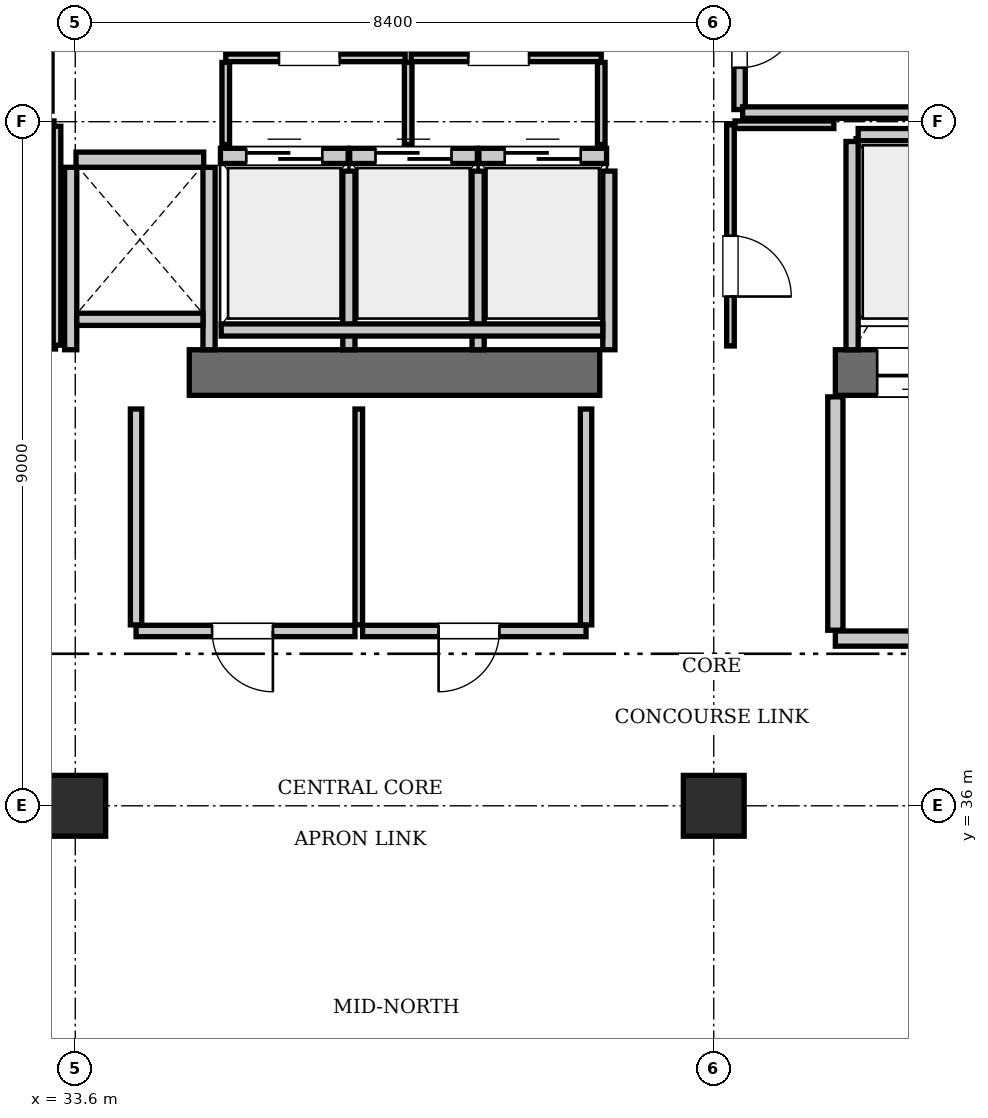
"""IFC4 building model, lengths in metres.
Left out: names, types, materials, properties, quantities, classifications, styles, units other than length and angle.
Written with IfcOpenShell. Run it as: python <this file> out.ifc"""

import sys

from ifc_helpers import new_model, si_unit, direction, frame, frame_2d, origin, origin_2d, place, context, subcontext, project, spatial, rectangle, extrude, element, fill, save


model = new_model("IFC4")
c1 = context("Model", 3, precision=1e-05, world=origin(), true_north=direction((0.0, 1.0)))
c2 = subcontext(c1, "Body", "Model", "MODEL_VIEW")
j1 = project(units=[si_unit("LENGTHUNIT", "METRE"), si_unit("PLANEANGLEUNIT", "RADIAN")], contexts=[c1])
p1 = place(None, origin())
s1 = spatial("IfcSite", under=j1, at=p1, CompositionType="ELEMENT")
p2 = place(p1, origin())
s2 = spatial("IfcBuilding", under=s1, at=p2, CompositionType="ELEMENT")
p3 = place(p2, frame((0.0, 0.0, 301.0)))
s3 = spatial("IfcBuildingStorey", under=s2, at=p3, CompositionType="ELEMENT", Elevation=301.0)
p4 = place(p3, frame((35.1, 41.7, 0.0), z_axis=(0.0, 0.0, 1.0), x_axis=(1.0, 0.0, 0.0)))
e1 = element("IfcWall", 1, at=p4, inside=s3, PredefinedType="SHEAR", context=c2, shape_type="SweptSolid", body=[
    extrude(rectangle(XDim=5.4, YDim=0.6, at=frame_2d((2.7, 0.0))), origin(), (0.0, 0.0, 1.0), 3.85),
])
p5 = place(p3, frame((43.6, 41.7, 0.0), z_axis=(0.0, 0.0, 1.0), x_axis=(1.0, 0.0, 0.0)))
e2 = element("IfcWall", 2, at=p5, inside=s3, PredefinedType="SHEAR", context=c2, shape_type="SweptSolid", body=[
    extrude(rectangle(XDim=6.8, YDim=0.6, at=frame_2d((3.4, 0.0))), origin(), (0.0, 0.0, 1.0), 3.85),
])
p6 = place(p5, frame((3.9, 0.0, 0.0)))
e3 = element("IfcOpeningElement", 3, at=p6, cuts=e2, PredefinedType="OPENING", context=c2, shape_type="SweptSolid", body=[
    extrude(rectangle(XDim=1.15, YDim=2.15, at=frame_2d((0.575, 1.075))), frame((0.0, 0.31, 0.0), z_axis=(0.0, -1.0, 0.0), x_axis=(1.0, 0.0, 0.0)), (0.0, 0.0, 1.0), 0.62),
])
p7 = place(p5, frame((0.55, 0.0, 0.0)))
e4 = element("IfcOpeningElement", 4, at=p7, cuts=e2, PredefinedType="OPENING", context=c2, shape_type="SweptSolid", body=[
    extrude(rectangle(XDim=1.1, YDim=2.2, at=frame_2d((0.55, 1.1))), frame((0.0, 0.31, 0.0), z_axis=(0.0, -1.0, 0.0), x_axis=(1.0, 0.0, 0.0)), (0.0, 0.0, 1.0), 0.62),
])
for number, where, z_axis, x_axis in (
    (5, (33.6, 36.0, 0.0), (0.0, 0.0, 1.0), (1.0, 0.0, 0.0)),
    (6, (42.0, 36.0, 0.0), (0.0, 0.0, 1.0), (1.0, 0.0, 0.0)),
):
    element("IfcColumn", number, at=place(p3, frame(where, z_axis=z_axis, x_axis=x_axis)), inside=s3, PredefinedType="COLUMN", context=c2, shape_type="SweptSolid", body=[
        extrude(rectangle(XDim=0.8, YDim=0.8, at=origin_2d()), origin(), (0.0, 0.0, 1.0), 3.85),
    ])
p8 = place(p3, frame((35.51, 44.55, 0.0), z_axis=(0.0, 0.0, 1.0), x_axis=(1.0, 0.0, 0.0)))
e7 = element("IfcWall", 7, at=p8, inside=s3, PredefinedType="SOLIDWALL", context=c2, shape_type="SweptSolid", body=[
    extrude(rectangle(XDim=1.68, YDim=0.2, at=frame_2d((0.84, 0.0))), origin(), (0.0, 0.0, 1.0), 3.61),
])
p9 = place(p8, frame((0.34, 0.0, 0.0)))
e8 = element("IfcOpeningElement", 8, at=p9, cuts=e7, PredefinedType="OPENING", context=c2, shape_type="SweptSolid", body=[
    extrude(rectangle(XDim=1.0, YDim=2.15, at=frame_2d((0.5, 1.075))), frame((0.0, 0.11, 0.0), z_axis=(0.0, -1.0, 0.0), x_axis=(1.0, 0.0, 0.0)), (0.0, 0.0, 1.0), 0.22),
])
p10 = place(p3, frame((37.21, 44.55, 0.0), z_axis=(0.0, 0.0, 1.0), x_axis=(1.0, 0.0, 0.0)))
e9 = element("IfcWall", 9, at=p10, inside=s3, PredefinedType="SOLIDWALL", context=c2, shape_type="SweptSolid", body=[
    extrude(rectangle(XDim=1.68, YDim=0.2, at=frame_2d((0.84, 0.0))), origin(), (0.0, 0.0, 1.0), 3.61),
])
p11 = place(p10, frame((0.34, 0.0, 0.0)))
e10 = element("IfcOpeningElement", 10, at=p11, cuts=e9, PredefinedType="OPENING", context=c2, shape_type="SweptSolid", body=[
    extrude(rectangle(XDim=1.0, YDim=2.15, at=frame_2d((0.5, 1.075))), frame((0.0, 0.11, 0.0), z_axis=(0.0, -1.0, 0.0), x_axis=(1.0, 0.0, 0.0)), (0.0, 0.0, 1.0), 0.22),
])
p12 = place(p3, frame((38.91, 44.55, 0.0), z_axis=(0.0, 0.0, 1.0), x_axis=(1.0, 0.0, 0.0)))
e11 = element("IfcWall", 11, at=p12, inside=s3, PredefinedType="SOLIDWALL", context=c2, shape_type="SweptSolid", body=[
    extrude(rectangle(XDim=1.68, YDim=0.2, at=frame_2d((0.84, 0.0))), origin(), (0.0, 0.0, 1.0), 3.61),
])
p13 = place(p12, frame((0.34, 0.0, 0.0)))
e12 = element("IfcOpeningElement", 12, at=p13, cuts=e11, PredefinedType="OPENING", context=c2, shape_type="SweptSolid", body=[
    extrude(rectangle(XDim=1.0, YDim=2.15, at=frame_2d((0.5, 1.075))), frame((0.0, 0.11, 0.0), z_axis=(0.0, -1.0, 0.0), x_axis=(1.0, 0.0, 0.0)), (0.0, 0.0, 1.0), 0.22),
])
p14 = place(p3, frame((33.61, 44.5, 0.0), z_axis=(0.0, 0.0, 1.0), x_axis=(1.0, 0.0, 0.0)))
e13 = element("IfcWall", 13, at=p14, inside=s3, PredefinedType="SOLIDWALL", context=c2, shape_type="SweptSolid", body=[
    extrude(rectangle(XDim=1.68, YDim=0.2, at=frame_2d((0.84, 0.0))), origin(), (0.0, 0.0, 1.0), 3.61),
])
p15 = place(p3, frame((43.9, 44.83, 0.0), z_axis=(0.0, 0.0, 1.0), x_axis=(1.0, 0.0, 0.0)))
e14 = element("IfcWall", 14, at=p15, inside=s3, PredefinedType="SOLIDWALL", context=c2, shape_type="SweptSolid", body=[
    extrude(rectangle(XDim=1.6, YDim=0.16, at=frame_2d((0.8, 0.0))), origin(), (0.0, 0.0, 1.0), 3.61),
])
p16 = place(p3, frame((43.82, 42.0, 0.0), z_axis=(0.0, 0.0, 1.0), x_axis=(0.0, 1.0, 0.0)))
e15 = element("IfcWall", 15, at=p16, inside=s3, PredefinedType="SOLIDWALL", context=c2, shape_type="SweptSolid", body=[
    extrude(rectangle(XDim=2.74, YDim=0.16, at=frame_2d((1.37, 0.0))), origin(), (0.0, 0.0, 1.0), 3.61),
])
for number, where, z_axis, x_axis in (
    (16, (37.2, 42.0, 0.0), (0.0, 0.0, 1.0), (0.0, 1.0, 0.0)),
    (17, (38.9, 42.0, 0.0), (0.0, 0.0, 1.0), (0.0, 1.0, 0.0)),
    (18, (40.62, 42.0, 0.0), (0.0, 0.0, 1.0), (0.0, 1.0, 0.0)),
):
    element("IfcWall", number, at=place(p3, frame(where, z_axis=z_axis, x_axis=x_axis)), inside=s3, PredefinedType="SOLIDWALL", context=c2, shape_type="SweptSolid", body=[
        extrude(rectangle(XDim=2.35, YDim=0.16, at=frame_2d((1.175, 0.0))), origin(), (0.0, 0.0, 1.0), 3.61),
    ])
p17 = place(p3, frame((35.52, 42.26, 0.0), z_axis=(0.0, 0.0, 1.0), x_axis=(1.0, 0.0, 0.0)))
e19 = element("IfcWall", 19, at=p17, inside=s3, PredefinedType="SOLIDWALL", context=c2, shape_type="SweptSolid", body=[
    extrude(rectangle(XDim=5.02, YDim=0.16, at=frame_2d((2.51, 0.0))), origin(), (0.0, 0.0, 1.0), 3.61),
])
for number, where, z_axis, x_axis in (
    (20, (33.54, 42.0, 0.0), (0.0, 0.0, 1.0), (0.0, 1.0, 0.0)),
    (21, (35.36, 42.0, 0.0), (0.0, 0.0, 1.0), (0.0, 1.0, 0.0)),
):
    element("IfcWall", number, at=place(p3, frame(where, z_axis=z_axis, x_axis=x_axis)), inside=s3, PredefinedType="SOLIDWALL", context=c2, shape_type="SweptSolid", body=[
        extrude(rectangle(XDim=2.4, YDim=0.16, at=frame_2d((1.2, 0.0))), origin(), (0.0, 0.0, 1.0), 3.61),
    ])
p18 = place(p3, frame((33.62, 42.4, 0.0), z_axis=(0.0, 0.0, 1.0), x_axis=(1.0, 0.0, 0.0)))
e22 = element("IfcWall", 22, at=p18, inside=s3, PredefinedType="SOLIDWALL", context=c2, shape_type="SweptSolid", body=[
    extrude(rectangle(XDim=1.66, YDim=0.16, at=frame_2d((0.83, 0.0))), origin(), (0.0, 0.0, 1.0), 3.61),
])
p19 = place(p3, frame((43.6, 38.2, 0.0), z_axis=(0.0, 0.0, 1.0), x_axis=(1.0, 0.0, 0.0)))
e23 = element("IfcWall", 23, at=p19, inside=s3, PredefinedType="PARTITIONING", context=c2, shape_type="SweptSolid", body=[
    extrude(rectangle(XDim=5.8, YDim=0.2, at=frame_2d((2.9, 0.0))), origin(), (0.0, 0.0, 1.0), 3.61),
])
p20 = place(p19, frame((2.3, 0.0, 0.0)))
e24 = element("IfcOpeningElement", 24, at=p20, cuts=e23, PredefinedType="OPENING", context=c2, shape_type="SweptSolid", body=[
    extrude(rectangle(XDim=1.15, YDim=2.15, at=frame_2d((0.575, 1.075))), frame((0.0, 0.11, 0.0), z_axis=(0.0, -1.0, 0.0), x_axis=(1.0, 0.0, 0.0)), (0.0, 0.0, 1.0), 0.22),
])
p21 = place(p3, frame((43.6, 38.31, 0.0), z_axis=(0.0, 0.0, 1.0), x_axis=(0.0, 1.0, 0.0)))
e25 = element("IfcWall", 25, at=p21, inside=s3, PredefinedType="PARTITIONING", context=c2, shape_type="SweptSolid", body=[
    extrude(rectangle(XDim=3.07, YDim=0.2, at=frame_2d((1.535, 0.0))), origin(), (0.0, 0.0, 1.0), 3.61),
])
p22 = place(p3, frame((32.02, 42.06, 0.0), z_axis=(0.0, 0.0, 1.0), x_axis=(1.0, 0.0, 0.0)))
e26 = element("IfcWall", 26, at=p22, inside=s3, PredefinedType="PARTITIONING", context=c2, shape_type="SweptSolid", body=[
    extrude(rectangle(XDim=1.32, YDim=0.1, at=frame_2d((0.66, 0.0))), origin(), (0.0, 0.0, 1.0), 3.61),
])
p23 = place(p22, frame((0.24, 0.0, 0.0)))
e27 = element("IfcOpeningElement", 27, at=p23, cuts=e26, PredefinedType="OPENING", context=c2, shape_type="SweptSolid", body=[
    extrude(rectangle(XDim=0.8, YDim=2.05, at=frame_2d((0.4, 1.025))), frame((0.0, 0.06, 0.0), z_axis=(0.0, -1.0, 0.0), x_axis=(1.0, 0.0, 0.0)), (0.0, 0.0, 1.0), 0.12),
])
p24 = place(p3, frame((31.84, 44.96, 0.0), z_axis=(0.0, 0.0, 1.0), x_axis=(1.0, 0.0, 0.0)))
e28 = element("IfcWall", 28, at=p24, inside=s3, PredefinedType="PARTITIONING", context=c2, shape_type="SweptSolid", body=[
    extrude(rectangle(XDim=1.48, YDim=0.1, at=frame_2d((0.74, 0.0))), origin(), (0.0, 0.0, 1.0), 3.61),
])
p25 = place(p3, frame((33.36, 42.06, 0.0), z_axis=(0.0, 0.0, 1.0), x_axis=(0.0, 1.0, 0.0)))
e29 = element("IfcWall", 29, at=p25, inside=s3, PredefinedType="PARTITIONING", context=c2, shape_type="SweptSolid", body=[
    extrude(rectangle(XDim=2.88, YDim=0.1, at=frame_2d((1.44, 0.0))), origin(), (0.0, 0.0, 1.0), 3.61),
])
p26 = place(p3, frame((35.58, 45.84, 0.0), z_axis=(0.0, 0.0, 1.0), x_axis=(1.0, 0.0, 0.0)))
e30 = element("IfcWall", 30, at=p26, inside=s3, PredefinedType="PARTITIONING", context=c2, shape_type="SweptSolid", body=[
    extrude(rectangle(XDim=2.36, YDim=0.1, at=frame_2d((1.18, 0.0))), origin(), (0.0, 0.0, 1.0), 3.61),
])
p27 = place(p26, frame((0.7, 0.0, 0.0)))
e31 = element("IfcOpeningElement", 31, at=p27, cuts=e30, PredefinedType="OPENING", context=c2, shape_type="SweptSolid", body=[
    extrude(rectangle(XDim=0.8, YDim=2.05, at=frame_2d((0.4, 1.025))), frame((0.0, 0.06, 0.0), z_axis=(0.0, -1.0, 0.0), x_axis=(1.0, 0.0, 0.0)), (0.0, 0.0, 1.0), 0.12),
])
p28 = place(p3, frame((38.02, 45.84, 0.0), z_axis=(0.0, 0.0, 1.0), x_axis=(1.0, 0.0, 0.0)))
e32 = element("IfcWall", 32, at=p28, inside=s3, PredefinedType="PARTITIONING", context=c2, shape_type="SweptSolid", body=[
    extrude(rectangle(XDim=2.5, YDim=0.1, at=frame_2d((1.25, 0.0))), origin(), (0.0, 0.0, 1.0), 3.61),
])
p29 = place(p28, frame((0.75, 0.0, 0.0)))
e33 = element("IfcOpeningElement", 33, at=p29, cuts=e32, PredefinedType="OPENING", context=c2, shape_type="SweptSolid", body=[
    extrude(rectangle(XDim=0.8, YDim=2.05, at=frame_2d((0.4, 1.025))), frame((0.0, 0.06, 0.0), z_axis=(0.0, -1.0, 0.0), x_axis=(1.0, 0.0, 0.0)), (0.0, 0.0, 1.0), 0.12),
])
for number, where, z_axis, x_axis in (
    (34, (35.58, 44.7, 0.0), (0.0, 0.0, 1.0), (0.0, 1.0, 0.0)),
    (35, (37.98, 44.7, 0.0), (0.0, 0.0, 1.0), (0.0, 1.0, 0.0)),
    (36, (40.52, 44.7, 0.0), (0.0, 0.0, 1.0), (0.0, 1.0, 0.0)),
):
    element("IfcWall", number, at=place(p3, frame(where, z_axis=z_axis, x_axis=x_axis)), inside=s3, PredefinedType="PARTITIONING", context=c2, shape_type="SweptSolid", body=[
        extrude(rectangle(XDim=1.08, YDim=0.1, at=frame_2d((0.54, 0.0))), origin(), (0.0, 0.0, 1.0), 3.61),
    ])
p30 = place(p3, frame((42.22, 42.05, 0.0), z_axis=(0.0, 0.0, 1.0), x_axis=(0.0, 1.0, 0.0)))
e37 = element("IfcWall", 37, at=p30, inside=s3, PredefinedType="PARTITIONING", context=c2, shape_type="SweptSolid", body=[
    extrude(rectangle(XDim=2.91, YDim=0.1, at=frame_2d((1.455, 0.0))), origin(), (0.0, 0.0, 1.0), 3.61),
])
p31 = place(p30, frame((0.65, 0.0, 0.0)))
e38 = element("IfcOpeningElement", 38, at=p31, cuts=e37, PredefinedType="OPENING", context=c2, shape_type="SweptSolid", body=[
    extrude(rectangle(XDim=0.8, YDim=2.05, at=frame_2d((0.4, 1.025))), frame((0.0, 0.06, 0.0), z_axis=(0.0, -1.0, 0.0), x_axis=(1.0, 0.0, 0.0)), (0.0, 0.0, 1.0), 0.12),
])
p32 = place(p3, frame((42.28, 44.96, 0.0), z_axis=(0.0, 0.0, 1.0), x_axis=(1.0, 0.0, 0.0)))
e39 = element("IfcWall", 39, at=p32, inside=s3, PredefinedType="PARTITIONING", context=c2, shape_type="SweptSolid", body=[
    extrude(rectangle(XDim=1.3, YDim=0.1, at=frame_2d((0.65, 0.0))), origin(), (0.0, 0.0, 1.0), 3.61),
])
p33 = place(p3, frame((42.34, 45.16, 0.0), z_axis=(0.0, 0.0, 1.0), x_axis=(0.0, 1.0, 0.0)))
e40 = element("IfcWall", 40, at=p33, inside=s3, PredefinedType="PARTITIONING", context=c2, shape_type="SweptSolid", body=[
    extrude(rectangle(XDim=2.38, YDim=0.15, at=frame_2d((1.19, 0.0))), origin(), (0.0, 0.0, 1.0), 3.61),
])
p34 = place(p33, frame((0.55, 0.0, 0.0)))
e41 = element("IfcOpeningElement", 41, at=p34, cuts=e40, PredefinedType="OPENING", context=c2, shape_type="SweptSolid", body=[
    extrude(rectangle(XDim=0.8, YDim=2.05, at=frame_2d((0.4, 1.025))), frame((0.0, 0.085, 0.0), z_axis=(0.0, -1.0, 0.0), x_axis=(1.0, 0.0, 0.0)), (0.0, 0.0, 1.0), 0.17),
])
p35 = place(p3, frame((42.38, 45.12, 0.0), z_axis=(0.0, 0.0, 1.0), x_axis=(1.0, 0.0, 0.0)))
e42 = element("IfcWall", 42, at=p35, inside=s3, PredefinedType="PARTITIONING", context=c2, shape_type="SweptSolid", body=[
    extrude(rectangle(XDim=3.14, YDim=0.15, at=frame_2d((1.57, 0.0))), origin(), (0.0, 0.0, 1.0), 3.61),
])
p36 = place(p3, frame((34.4, 38.3, 0.0), z_axis=(0.0, 0.0, 1.0), x_axis=(1.0, 0.0, 0.0)))
e43 = element("IfcWall", 43, at=p36, inside=s3, PredefinedType="PARTITIONING", context=c2, shape_type="SweptSolid", body=[
    extrude(rectangle(XDim=2.88, YDim=0.15, at=frame_2d((1.44, 0.0))), origin(), (0.0, 0.0, 1.0), 3.61),
])
p37 = place(p36, frame((1.0, 0.0, 0.0)))
e44 = element("IfcOpeningElement", 44, at=p37, cuts=e43, PredefinedType="OPENING", context=c2, shape_type="SweptSolid", body=[
    extrude(rectangle(XDim=0.8, YDim=2.05, at=frame_2d((0.4, 1.025))), frame((0.0, 0.085, 0.0), z_axis=(0.0, -1.0, 0.0), x_axis=(1.0, 0.0, 0.0)), (0.0, 0.0, 1.0), 0.17),
])
p38 = place(p3, frame((37.38, 38.3, 0.0), z_axis=(0.0, 0.0, 1.0), x_axis=(1.0, 0.0, 0.0)))
e45 = element("IfcWall", 45, at=p38, inside=s3, PredefinedType="PARTITIONING", context=c2, shape_type="SweptSolid", body=[
    extrude(rectangle(XDim=2.94, YDim=0.15, at=frame_2d((1.47, 0.0))), origin(), (0.0, 0.0, 1.0), 3.61),
])
p39 = place(p38, frame((1.0, 0.0, 0.0)))
e46 = element("IfcOpeningElement", 46, at=p39, cuts=e45, PredefinedType="OPENING", context=c2, shape_type="SweptSolid", body=[
    extrude(rectangle(XDim=0.8, YDim=2.05, at=frame_2d((0.4, 1.025))), frame((0.0, 0.085, 0.0), z_axis=(0.0, -1.0, 0.0), x_axis=(1.0, 0.0, 0.0)), (0.0, 0.0, 1.0), 0.17),
])
p40 = place(p3, frame((34.4, 38.38, 0.0), z_axis=(0.0, 0.0, 1.0), x_axis=(0.0, 1.0, 0.0)))
e47 = element("IfcWall", 47, at=p40, inside=s3, PredefinedType="PARTITIONING", context=c2, shape_type="SweptSolid", body=[
    extrude(rectangle(XDim=2.84, YDim=0.15, at=frame_2d((1.42, 0.0))), origin(), (0.0, 0.0, 1.0), 3.61),
])
p41 = place(p3, frame((37.33, 38.38, 0.0), z_axis=(0.0, 0.0, 1.0), x_axis=(0.0, 1.0, 0.0)))
e48 = element("IfcWall", 48, at=p41, inside=s3, PredefinedType="PARTITIONING", context=c2, shape_type="SweptSolid", body=[
    extrude(rectangle(XDim=2.84, YDim=0.1, at=frame_2d((1.42, 0.0))), origin(), (0.0, 0.0, 1.0), 3.61),
])
p42 = place(p3, frame((40.32, 38.38, 0.0), z_axis=(0.0, 0.0, 1.0), x_axis=(0.0, 1.0, 0.0)))
e49 = element("IfcWall", 49, at=p42, inside=s3, PredefinedType="PARTITIONING", context=c2, shape_type="SweptSolid", body=[
    extrude(rectangle(XDim=2.84, YDim=0.15, at=frame_2d((1.42, 0.0))), origin(), (0.0, 0.0, 1.0), 3.61),
])
p43 = place(p9, origin())
e50 = element("IfcDoor", 50, at=p43, inside=s3, OperationType="SLIDING_TO_LEFT", PredefinedType="DOOR", context=c2, shape_type="SweptSolid", body=[
    extrude(rectangle(XDim=1.0, YDim=2.15, at=frame_2d((0.5, 1.075))), frame((0.0, 0.025, 0.0), z_axis=(0.0, -1.0, 0.0), x_axis=(1.0, 0.0, 0.0)), (0.0, 0.0, 1.0), 0.05),
])
fill(e8, e50)
p44 = place(p11, origin())
e51 = element("IfcDoor", 51, at=p44, inside=s3, OperationType="SLIDING_TO_LEFT", PredefinedType="DOOR", context=c2, shape_type="SweptSolid", body=[
    extrude(rectangle(XDim=1.0, YDim=2.15, at=frame_2d((0.5, 1.075))), frame((0.0, 0.025, 0.0), z_axis=(0.0, -1.0, 0.0), x_axis=(1.0, 0.0, 0.0)), (0.0, 0.0, 1.0), 0.05),
])
fill(e10, e51)
p45 = place(p13, origin())
e52 = element("IfcDoor", 52, at=p45, inside=s3, OperationType="SLIDING_TO_LEFT", PredefinedType="DOOR", context=c2, shape_type="SweptSolid", body=[
    extrude(rectangle(XDim=1.0, YDim=2.15, at=frame_2d((0.5, 1.075))), frame((0.0, 0.025, 0.0), z_axis=(0.0, -1.0, 0.0), x_axis=(1.0, 0.0, 0.0)), (0.0, 0.0, 1.0), 0.05),
])
fill(e12, e52)
p46 = place(p7, frame((1.1, 0.0, 0.0), z_axis=(0.0, 0.0, 1.0), x_axis=(-1.0, 0.0, 0.0)))
e53 = element("IfcDoor", 53, at=p46, inside=s3, OperationType="SLIDING_TO_LEFT", PredefinedType="DOOR", context=c2, shape_type="SweptSolid", body=[
    extrude(rectangle(XDim=1.1, YDim=2.2, at=frame_2d((0.55, 1.1))), frame((0.0, 0.025, 0.0), z_axis=(0.0, -1.0, 0.0), x_axis=(1.0, 0.0, 0.0)), (0.0, 0.0, 1.0), 0.05),
])
fill(e4, e53)
p47 = place(p27, origin())
e54 = element("IfcDoor", 54, at=p47, inside=s3, OperationType="SINGLE_SWING_RIGHT", PredefinedType="DOOR", context=c2, shape_type="SweptSolid", body=[
    extrude(rectangle(XDim=0.8, YDim=2.05, at=frame_2d((0.4, 1.025))), frame((0.0, 0.025, 0.0), z_axis=(0.0, -1.0, 0.0), x_axis=(1.0, 0.0, 0.0)), (0.0, 0.0, 1.0), 0.05),
])
fill(e31, e54)
p48 = place(p29, origin())
e55 = element("IfcDoor", 55, at=p48, inside=s3, OperationType="SINGLE_SWING_LEFT", PredefinedType="DOOR", context=c2, shape_type="SweptSolid", body=[
    extrude(rectangle(XDim=0.8, YDim=2.05, at=frame_2d((0.4, 1.025))), frame((0.0, 0.025, 0.0), z_axis=(0.0, -1.0, 0.0), x_axis=(1.0, 0.0, 0.0)), (0.0, 0.0, 1.0), 0.05),
])
fill(e33, e55)
p49 = place(p31, frame((0.8, 0.0, 0.0), z_axis=(0.0, 0.0, 1.0), x_axis=(-1.0, 0.0, 0.0)))
e56 = element("IfcDoor", 56, at=p49, inside=s3, OperationType="SINGLE_SWING_RIGHT", PredefinedType="DOOR", context=c2, shape_type="SweptSolid", body=[
    extrude(rectangle(XDim=0.8, YDim=2.05, at=frame_2d((0.4, 1.025))), frame((0.0, 0.025, 0.0), z_axis=(0.0, -1.0, 0.0), x_axis=(1.0, 0.0, 0.0)), (0.0, 0.0, 1.0), 0.05),
])
fill(e38, e56)
p50 = place(p34, frame((0.8, 0.0, 0.0), z_axis=(0.0, 0.0, 1.0), x_axis=(-1.0, 0.0, 0.0)))
e57 = element("IfcDoor", 57, at=p50, inside=s3, OperationType="SINGLE_SWING_LEFT", PredefinedType="DOOR", context=c2, shape_type="SweptSolid", body=[
    extrude(rectangle(XDim=0.8, YDim=2.05, at=frame_2d((0.4, 1.025))), frame((0.0, 0.025, 0.0), z_axis=(0.0, -1.0, 0.0), x_axis=(1.0, 0.0, 0.0)), (0.0, 0.0, 1.0), 0.05),
])
fill(e41, e57)
p51 = place(p37, frame((0.8, 0.0, 0.0), z_axis=(0.0, 0.0, 1.0), x_axis=(-1.0, 0.0, 0.0)))
e58 = element("IfcDoor", 58, at=p51, inside=s3, OperationType="SINGLE_SWING_LEFT", PredefinedType="DOOR", context=c2, shape_type="SweptSolid", body=[
    extrude(rectangle(XDim=0.8, YDim=2.05, at=frame_2d((0.4, 1.025))), frame((0.0, 0.025, 0.0), z_axis=(0.0, -1.0, 0.0), x_axis=(1.0, 0.0, 0.0)), (0.0, 0.0, 1.0), 0.05),
])
fill(e44, e58)
p52 = place(p39, frame((0.8, 0.0, 0.0), z_axis=(0.0, 0.0, 1.0), x_axis=(-1.0, 0.0, 0.0)))
e59 = element("IfcDoor", 59, at=p52, inside=s3, OperationType="SINGLE_SWING_RIGHT", PredefinedType="DOOR", context=c2, shape_type="SweptSolid", body=[
    extrude(rectangle(XDim=0.8, YDim=2.05, at=frame_2d((0.4, 1.025))), frame((0.0, 0.025, 0.0), z_axis=(0.0, -1.0, 0.0), x_axis=(1.0, 0.0, 0.0)), (0.0, 0.0, 1.0), 0.05),
])
fill(e46, e59)
save(model, sys.argv[1])
